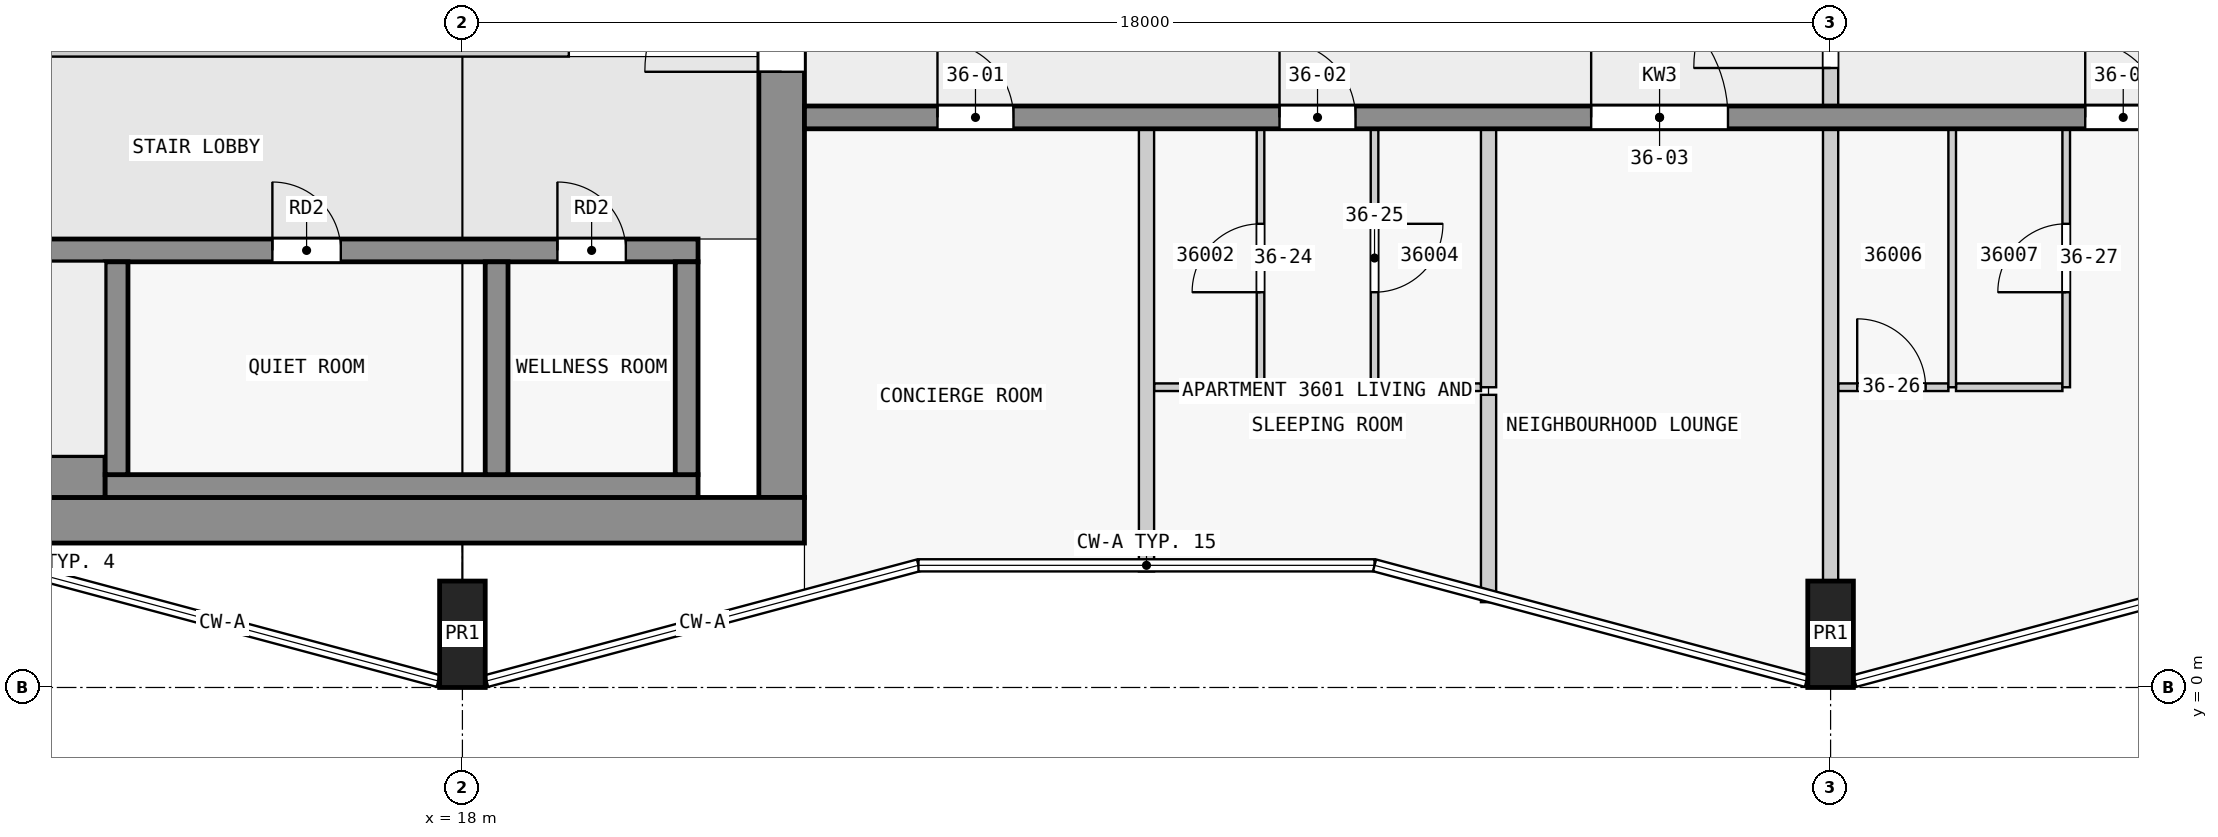
"""IFC4 building model, lengths in metres.
Left out: names, types, materials, properties, quantities, classifications, styles, units other than length and angle.
Written with IfcOpenShell. Run it as: python <this file> out.ifc"""

import sys

from ifc_helpers import new_model, si_unit, direction, frame, frame_2d, origin, origin_2d, place, context, subcontext, project, spatial, rectangle, extrude, element, fill, save


model = new_model("IFC4")
c1 = context("Model", 3, precision=1e-05, world=origin(), true_north=direction((0.0, 1.0)))
c2 = subcontext(c1, "Body", "Model", "MODEL_VIEW")
j1 = project(units=[si_unit("LENGTHUNIT", "METRE"), si_unit("PLANEANGLEUNIT", "RADIAN")], contexts=[c1])
p1 = place(None, origin())
s1 = spatial("IfcSite", under=j1, at=p1, CompositionType="ELEMENT")
p2 = place(p1, origin())
s2 = spatial("IfcBuilding", under=s1, at=p2, CompositionType="ELEMENT")
p3 = place(p2, frame((0.0, 0.0, 142.9)))
s3 = spatial("IfcBuildingStorey", under=s2, at=p3, CompositionType="ELEMENT", Elevation=142.9)
for number, where, z_axis, x_axis in (
    (1, (18.0, 0.7, 0.0), (0.0, 0.0, 1.0), (1.0, 0.0, 0.0)),
    (2, (36.0, 0.7, 0.0), (0.0, 0.0, 1.0), (1.0, 0.0, 0.0)),
):
    element("IfcColumn", number, at=place(p3, frame(where, z_axis=z_axis, x_axis=x_axis)), inside=s3, PredefinedType="COLUMN", context=c2, shape_type="SweptSolid", body=[
        extrude(rectangle(XDim=0.6, YDim=1.4, at=origin_2d()), origin(), (0.0, 0.0, 1.0), 3.5),
    ])
p4 = place(p3, frame((1.7, 2.2, 0.0), z_axis=(0.0, 0.0, 1.0), x_axis=(1.0, 0.0, 0.0)))
e3 = element("IfcWall", 3, at=p4, inside=s3, PredefinedType="SHEAR", context=c2, shape_type="SweptSolid", body=[
    extrude(rectangle(XDim=20.8, YDim=0.6, at=frame_2d((10.4, 0.0))), origin(), (0.0, 0.0, 1.0), 3.25),
])
p5 = place(p3, frame((22.2, 2.5, 0.0), z_axis=(0.0, 0.0, 1.0), x_axis=(0.0, 1.0, 0.0)))
e4 = element("IfcWall", 4, at=p5, inside=s3, PredefinedType="SHEAR", context=c2, shape_type="SweptSolid", body=[
    extrude(rectangle(XDim=14.9, YDim=0.6, at=frame_2d((7.45, 0.0))), origin(), (0.0, 0.0, 1.0), 3.25),
])
p6 = place(p5, frame((5.6, 0.0, 0.0)))
e5 = element("IfcOpeningElement", 5, at=p6, cuts=e4, PredefinedType="OPENING", context=c2, shape_type="SweptSolid", body=[
    extrude(rectangle(XDim=1.8, YDim=2.1, at=frame_2d((0.9, 1.05))), frame((0.0, 0.31, 0.0), z_axis=(0.0, -1.0, 0.0), x_axis=(1.0, 0.0, 0.0)), (0.0, 0.0, 1.0), 0.62),
])
p7 = place(p3, frame((6.9, 2.775, 0.0), z_axis=(0.0, 0.0, 1.0), x_axis=(1.0, 0.0, 0.0)))
e6 = element("IfcWall", 6, at=p7, inside=s3, PredefinedType="SHEAR", context=c2, shape_type="SweptSolid", body=[
    extrude(rectangle(XDim=6.4, YDim=0.55, at=frame_2d((3.2, 0.0))), origin(), (0.0, 0.0, 1.0), 3.25),
])
p8 = place(p3, frame((13.3, 2.65, 0.0), z_axis=(0.0, 0.0, 1.0), x_axis=(1.0, 0.0, 0.0)))
e7 = element("IfcWall", 7, at=p8, inside=s3, PredefinedType="SHEAR", context=c2, shape_type="SweptSolid", body=[
    extrude(rectangle(XDim=7.8, YDim=0.3, at=frame_2d((3.9, 0.0))), origin(), (0.0, 0.0, 1.0), 3.25),
])
for number, where, z_axis, x_axis in (
    (8, (13.45, 2.8, 0.0), (0.0, 0.0, 1.0), (0.0, 1.0, 0.0)),
    (9, (18.45, 2.8, 0.0), (0.0, 0.0, 1.0), (0.0, 1.0, 0.0)),
    (10, (20.95, 2.8, 0.0), (0.0, 0.0, 1.0), (0.0, 1.0, 0.0)),
):
    element("IfcWall", number, at=place(p3, frame(where, z_axis=z_axis, x_axis=x_axis)), inside=s3, PredefinedType="SHEAR", context=c2, shape_type="SweptSolid", body=[
        extrude(rectangle(XDim=2.8, YDim=0.3, at=frame_2d((1.4, 0.0))), origin(), (0.0, 0.0, 1.0), 3.25),
    ])
p9 = place(p3, frame((2.3, 5.75, 0.0), z_axis=(0.0, 0.0, 1.0), x_axis=(1.0, 0.0, 0.0)))
e11 = element("IfcWall", 11, at=p9, inside=s3, PredefinedType="SHEAR", context=c2, shape_type="SweptSolid", body=[
    extrude(rectangle(XDim=18.8, YDim=0.3, at=frame_2d((9.4, 0.0))), origin(), (0.0, 0.0, 1.0), 3.25),
])
p10 = place(p9, frame((4.65, 0.0, 0.0)))
e12 = element("IfcOpeningElement", 12, at=p10, cuts=e11, PredefinedType="OPENING", context=c2, shape_type="SweptSolid", body=[
    extrude(rectangle(XDim=1.1, YDim=2.1, at=frame_2d((0.55, 1.05))), frame((0.0, 0.16, 0.0), z_axis=(0.0, -1.0, 0.0), x_axis=(1.0, 0.0, 0.0)), (0.0, 0.0, 1.0), 0.32),
])
p11 = place(p9, frame((0.45, 0.0, 0.0)))
e13 = element("IfcOpeningElement", 13, at=p11, cuts=e11, PredefinedType="OPENING", context=c2, shape_type="SweptSolid", body=[
    extrude(rectangle(XDim=1.1, YDim=2.1, at=frame_2d((0.55, 1.05))), frame((0.0, 0.16, 0.0), z_axis=(0.0, -1.0, 0.0), x_axis=(1.0, 0.0, 0.0)), (0.0, 0.0, 1.0), 0.32),
])
p12 = place(p9, frame((2.75, 0.0, 0.0)))
e14 = element("IfcOpeningElement", 14, at=p12, cuts=e11, PredefinedType="OPENING", context=c2, shape_type="SweptSolid", body=[
    extrude(rectangle(XDim=1.1, YDim=2.1, at=frame_2d((0.55, 1.05))), frame((0.0, 0.16, 0.0), z_axis=(0.0, -1.0, 0.0), x_axis=(1.0, 0.0, 0.0)), (0.0, 0.0, 1.0), 0.32),
])
p13 = place(p9, frame((13.2, 0.0, 0.0)))
e15 = element("IfcOpeningElement", 15, at=p13, cuts=e11, PredefinedType="OPENING", context=c2, shape_type="SweptSolid", body=[
    extrude(rectangle(XDim=0.9, YDim=2.1, at=frame_2d((0.45, 1.05))), frame((0.0, 0.16, 0.0), z_axis=(0.0, -1.0, 0.0), x_axis=(1.0, 0.0, 0.0)), (0.0, 0.0, 1.0), 0.32),
])
p14 = place(p9, frame((16.95, 0.0, 0.0)))
e16 = element("IfcOpeningElement", 16, at=p14, cuts=e11, PredefinedType="OPENING", context=c2, shape_type="SweptSolid", body=[
    extrude(rectangle(XDim=0.9, YDim=2.1, at=frame_2d((0.45, 1.05))), frame((0.0, 0.16, 0.0), z_axis=(0.0, -1.0, 0.0), x_axis=(1.0, 0.0, 0.0)), (0.0, 0.0, 1.0), 0.32),
])
p15 = place(p3, frame((22.5, 7.5, 0.0), z_axis=(0.0, 0.0, 1.0), x_axis=(1.0, 0.0, 0.0)))
e17 = element("IfcWall", 17, at=p15, inside=s3, PredefinedType="SHEAR", context=c2, shape_type="SweptSolid", body=[
    extrude(rectangle(XDim=22.5, YDim=0.3, at=frame_2d((11.25, 0.0))), origin(), (0.0, 0.0, 1.0), 3.25),
])
p16 = place(p15, frame((1.75, 0.0, 0.0)))
e18 = element("IfcOpeningElement", 18, at=p16, cuts=e17, PredefinedType="OPENING", context=c2, shape_type="SweptSolid", body=[
    extrude(rectangle(XDim=1.0, YDim=2.1, at=frame_2d((0.5, 1.05))), frame((0.0, 0.16, 0.0), z_axis=(0.0, -1.0, 0.0), x_axis=(1.0, 0.0, 0.0)), (0.0, 0.0, 1.0), 0.32),
])
p17 = place(p15, frame((6.25, 0.0, 0.0)))
e19 = element("IfcOpeningElement", 19, at=p17, cuts=e17, PredefinedType="OPENING", context=c2, shape_type="SweptSolid", body=[
    extrude(rectangle(XDim=1.0, YDim=2.1, at=frame_2d((0.5, 1.05))), frame((0.0, 0.16, 0.0), z_axis=(0.0, -1.0, 0.0), x_axis=(1.0, 0.0, 0.0)), (0.0, 0.0, 1.0), 0.32),
])
p18 = place(p15, frame((10.35, 0.0, 0.0)))
e20 = element("IfcOpeningElement", 20, at=p18, cuts=e17, PredefinedType="OPENING", context=c2, shape_type="SweptSolid", body=[
    extrude(rectangle(XDim=1.8, YDim=2.1, at=frame_2d((0.9, 1.05))), frame((0.0, 0.16, 0.0), z_axis=(0.0, -1.0, 0.0), x_axis=(1.0, 0.0, 0.0)), (0.0, 0.0, 1.0), 0.32),
])
p19 = place(p15, frame((16.85, 0.0, 0.0)))
e21 = element("IfcOpeningElement", 21, at=p19, cuts=e17, PredefinedType="OPENING", context=c2, shape_type="SweptSolid", body=[
    extrude(rectangle(XDim=1.0, YDim=2.1, at=frame_2d((0.5, 1.05))), frame((0.0, 0.16, 0.0), z_axis=(0.0, -1.0, 0.0), x_axis=(1.0, 0.0, 0.0)), (0.0, 0.0, 1.0), 0.32),
])
p20 = place(p3, frame((10.9, 8.4, 0.0), z_axis=(0.0, 0.0, 1.0), x_axis=(1.0, 0.0, 0.0)))
e22 = element("IfcWall", 22, at=p20, inside=s3, PredefinedType="PARTITIONING", context=c2, shape_type="SweptSolid", body=[
    extrude(rectangle(XDim=8.5, YDim=0.2, at=frame_2d((4.25, 0.0))), origin(), (0.0, 0.0, 1.0), 3.25),
])
for number, where, z_axis, x_axis in (
    (23, (27.1, 3.95, 0.0), (0.0, 0.0, 1.0), (1.0, 0.0, 0.0)),
    (24, (30.05, 3.95, 0.0), (0.0, 0.0, 1.0), (1.0, 0.0, 0.0)),
):
    element("IfcWall", number, at=place(p3, frame(where, z_axis=z_axis, x_axis=x_axis)), inside=s3, PredefinedType="PARTITIONING", context=c2, shape_type="SweptSolid", body=[
        extrude(rectangle(XDim=1.35, YDim=0.1, at=frame_2d((0.675, 0.0))), origin(), (0.0, 0.0, 1.0), 3.25),
    ])
p21 = place(p3, frame((36.1, 3.95, 0.0), z_axis=(0.0, 0.0, 1.0), x_axis=(1.0, 0.0, 0.0)))
e25 = element("IfcWall", 25, at=p21, inside=s3, PredefinedType="PARTITIONING", context=c2, shape_type="SweptSolid", body=[
    extrude(rectangle(XDim=1.45, YDim=0.1, at=frame_2d((0.725, 0.0))), origin(), (0.0, 0.0, 1.0), 3.25),
])
p22 = place(p21, frame((0.25, 0.0, 0.0)))
e26 = element("IfcOpeningElement", 26, at=p22, cuts=e25, PredefinedType="OPENING", context=c2, shape_type="SweptSolid", body=[
    extrude(rectangle(XDim=0.9, YDim=2.1, at=frame_2d((0.45, 1.05))), frame((0.0, 0.06, 0.0), z_axis=(0.0, -1.0, 0.0), x_axis=(1.0, 0.0, 0.0)), (0.0, 0.0, 1.0), 0.12),
])
p23 = place(p3, frame((37.65, 3.95, 0.0), z_axis=(0.0, 0.0, 1.0), x_axis=(1.0, 0.0, 0.0)))
e27 = element("IfcWall", 27, at=p23, inside=s3, PredefinedType="PARTITIONING", context=c2, shape_type="SweptSolid", body=[
    extrude(rectangle(XDim=1.4, YDim=0.1, at=frame_2d((0.7, 0.0))), origin(), (0.0, 0.0, 1.0), 3.25),
])
p24 = place(p3, frame((27.0, 1.527, 0.0), z_axis=(0.0, 0.0, 1.0), x_axis=(0.0, 1.0, 0.0)))
e28 = element("IfcWall", 28, at=p24, inside=s3, PredefinedType="PARTITIONING", context=c2, shape_type="SweptSolid", body=[
    extrude(rectangle(XDim=5.823, YDim=0.2, at=frame_2d((2.912, 0.0))), origin(), (0.0, 0.0, 1.0), 3.25),
])
p25 = place(p3, frame((28.5, 3.95, 0.0), z_axis=(0.0, 0.0, 1.0), x_axis=(0.0, 1.0, 0.0)))
e29 = element("IfcWall", 29, at=p25, inside=s3, PredefinedType="PARTITIONING", context=c2, shape_type="SweptSolid", body=[
    extrude(rectangle(XDim=3.4, YDim=0.1, at=frame_2d((1.7, 0.0))), origin(), (0.0, 0.0, 1.0), 3.25),
])
p26 = place(p25, frame((1.25, 0.0, 0.0)))
e30 = element("IfcOpeningElement", 30, at=p26, cuts=e29, PredefinedType="OPENING", context=c2, shape_type="SweptSolid", body=[
    extrude(rectangle(XDim=0.9, YDim=2.1, at=frame_2d((0.45, 1.05))), frame((0.0, 0.06, 0.0), z_axis=(0.0, -1.0, 0.0), x_axis=(1.0, 0.0, 0.0)), (0.0, 0.0, 1.0), 0.12),
])
p27 = place(p3, frame((30.0, 7.35, 0.0), z_axis=(0.0, 0.0, 1.0), x_axis=(0.0, -1.0, 0.0)))
e31 = element("IfcWall", 31, at=p27, inside=s3, PredefinedType="PARTITIONING", context=c2, shape_type="SweptSolid", body=[
    extrude(rectangle(XDim=3.4, YDim=0.1, at=frame_2d((1.7, 0.0))), origin(), (0.0, 0.0, 1.0), 3.25),
])
p28 = place(p27, frame((1.25, 0.0, 0.0)))
e32 = element("IfcOpeningElement", 32, at=p28, cuts=e31, PredefinedType="OPENING", context=c2, shape_type="SweptSolid", body=[
    extrude(rectangle(XDim=0.9, YDim=2.1, at=frame_2d((0.45, 1.05))), frame((0.0, 0.06, 0.0), z_axis=(0.0, -1.0, 0.0), x_axis=(1.0, 0.0, 0.0)), (0.0, 0.0, 1.0), 0.12),
])
p29 = place(p3, frame((31.5, 3.85, 0.0), z_axis=(0.0, 0.0, 1.0), x_axis=(0.0, -1.0, 0.0)))
e33 = element("IfcWall", 33, at=p29, inside=s3, PredefinedType="PARTITIONING", context=c2, shape_type="SweptSolid", body=[
    extrude(rectangle(XDim=2.728, YDim=0.2, at=frame_2d((1.364, 0.0))), origin(), (0.0, 0.0, 1.0), 3.25),
])
p30 = place(p3, frame((31.5, 3.95, 0.0), z_axis=(0.0, 0.0, 1.0), x_axis=(0.0, 1.0, 0.0)))
e34 = element("IfcWall", 34, at=p30, inside=s3, PredefinedType="PARTITIONING", context=c2, shape_type="SweptSolid", body=[
    extrude(rectangle(XDim=3.4, YDim=0.2, at=frame_2d((1.7, 0.0))), origin(), (0.0, 0.0, 1.0), 3.25),
])
p31 = place(p3, frame((36.0, 1.4, 0.0), z_axis=(0.0, 0.0, 1.0), x_axis=(0.0, 1.0, 0.0)))
e35 = element("IfcWall", 35, at=p31, inside=s3, PredefinedType="PARTITIONING", context=c2, shape_type="SweptSolid", body=[
    extrude(rectangle(XDim=5.95, YDim=0.2, at=frame_2d((2.975, 0.0))), origin(), (0.0, 0.0, 1.0), 3.25),
])
p32 = place(p3, frame((37.6, 3.95, 0.0), z_axis=(0.0, 0.0, 1.0), x_axis=(0.0, 1.0, 0.0)))
e36 = element("IfcWall", 36, at=p32, inside=s3, PredefinedType="PARTITIONING", context=c2, shape_type="SweptSolid", body=[
    extrude(rectangle(XDim=3.4, YDim=0.1, at=frame_2d((1.7, 0.0))), origin(), (0.0, 0.0, 1.0), 3.25),
])
p33 = place(p3, frame((39.1, 3.95, 0.0), z_axis=(0.0, 0.0, 1.0), x_axis=(0.0, 1.0, 0.0)))
e37 = element("IfcWall", 37, at=p33, inside=s3, PredefinedType="PARTITIONING", context=c2, shape_type="SweptSolid", body=[
    extrude(rectangle(XDim=3.4, YDim=0.1, at=frame_2d((1.7, 0.0))), origin(), (0.0, 0.0, 1.0), 3.25),
])
p34 = place(p33, frame((1.25, 0.0, 0.0)))
e38 = element("IfcOpeningElement", 38, at=p34, cuts=e37, PredefinedType="OPENING", context=c2, shape_type="SweptSolid", body=[
    extrude(rectangle(XDim=0.9, YDim=2.1, at=frame_2d((0.45, 1.05))), frame((0.0, 0.06, 0.0), z_axis=(0.0, -1.0, 0.0), x_axis=(1.0, 0.0, 0.0)), (0.0, 0.0, 1.0), 0.12),
])
p35 = place(p3, frame((36.0, 7.45, 0.0), z_axis=(0.0, 0.0, 1.0), x_axis=(0.0, 1.0, 0.0)))
e39 = element("IfcWall", 39, at=p35, inside=s3, PredefinedType="PARTITIONING", context=c2, shape_type="SweptSolid", body=[
    extrude(rectangle(XDim=3.1, YDim=0.2, at=frame_2d((1.55, 0.0))), origin(), (0.0, 0.0, 1.0), 3.25),
])
p36 = place(p35, frame((0.7, 0.0, 0.0)))
e40 = element("IfcOpeningElement", 40, at=p36, cuts=e39, PredefinedType="OPENING", context=c2, shape_type="SweptSolid", body=[
    extrude(rectangle(XDim=1.8, YDim=2.1, at=frame_2d((0.9, 1.05))), frame((0.0, 0.11, 0.0), z_axis=(0.0, -1.0, 0.0), x_axis=(1.0, 0.0, 0.0)), (0.0, 0.0, 1.0), 0.22),
])
p37 = place(p6, origin())
e41 = element("IfcDoor", 41, at=p37, inside=s3, OperationType="DOUBLE_DOOR_SINGLE_SWING", PredefinedType="DOOR", context=c2, shape_type="SweptSolid", body=[
    extrude(rectangle(XDim=1.8, YDim=2.1, at=frame_2d((0.9, 1.05))), frame((0.0, 0.025, 0.0), z_axis=(0.0, -1.0, 0.0), x_axis=(1.0, 0.0, 0.0)), (0.0, 0.0, 1.0), 0.05),
])
fill(e5, e41)
p38 = place(p13, origin())
e42 = element("IfcDoor", 42, at=p38, inside=s3, OperationType="SINGLE_SWING_LEFT", PredefinedType="DOOR", context=c2, shape_type="SweptSolid", body=[
    extrude(rectangle(XDim=0.9, YDim=2.1, at=frame_2d((0.45, 1.05))), frame((0.0, 0.025, 0.0), z_axis=(0.0, -1.0, 0.0), x_axis=(1.0, 0.0, 0.0)), (0.0, 0.0, 1.0), 0.05),
])
fill(e15, e42)
p39 = place(p14, origin())
e43 = element("IfcDoor", 43, at=p39, inside=s3, OperationType="SINGLE_SWING_LEFT", PredefinedType="DOOR", context=c2, shape_type="SweptSolid", body=[
    extrude(rectangle(XDim=0.9, YDim=2.1, at=frame_2d((0.45, 1.05))), frame((0.0, 0.025, 0.0), z_axis=(0.0, -1.0, 0.0), x_axis=(1.0, 0.0, 0.0)), (0.0, 0.0, 1.0), 0.05),
])
fill(e16, e43)
p40 = place(p16, origin())
e44 = element("IfcDoor", 44, at=p40, inside=s3, OperationType="SINGLE_SWING_LEFT", PredefinedType="DOOR", context=c2, shape_type="SweptSolid", body=[
    extrude(rectangle(XDim=1.0, YDim=2.1, at=frame_2d((0.5, 1.05))), frame((0.0, 0.025, 0.0), z_axis=(0.0, -1.0, 0.0), x_axis=(1.0, 0.0, 0.0)), (0.0, 0.0, 1.0), 0.05),
])
fill(e18, e44)
p41 = place(p17, origin())
e45 = element("IfcDoor", 45, at=p41, inside=s3, OperationType="SINGLE_SWING_LEFT", PredefinedType="DOOR", context=c2, shape_type="SweptSolid", body=[
    extrude(rectangle(XDim=1.0, YDim=2.1, at=frame_2d((0.5, 1.05))), frame((0.0, 0.025, 0.0), z_axis=(0.0, -1.0, 0.0), x_axis=(1.0, 0.0, 0.0)), (0.0, 0.0, 1.0), 0.05),
])
fill(e19, e45)
p42 = place(p18, origin())
e46 = element("IfcDoor", 46, at=p42, inside=s3, OperationType="SINGLE_SWING_LEFT", PredefinedType="DOOR", context=c2, shape_type="SweptSolid", body=[
    extrude(rectangle(XDim=1.8, YDim=2.1, at=frame_2d((0.9, 1.05))), frame((0.0, 0.025, 0.0), z_axis=(0.0, -1.0, 0.0), x_axis=(1.0, 0.0, 0.0)), (0.0, 0.0, 1.0), 0.05),
])
fill(e20, e46)
p43 = place(p19, origin())
e47 = element("IfcDoor", 47, at=p43, inside=s3, OperationType="SINGLE_SWING_RIGHT", PredefinedType="DOOR", context=c2, shape_type="SweptSolid", body=[
    extrude(rectangle(XDim=1.0, YDim=2.1, at=frame_2d((0.5, 1.05))), frame((0.0, 0.025, 0.0), z_axis=(0.0, -1.0, 0.0), x_axis=(1.0, 0.0, 0.0)), (0.0, 0.0, 1.0), 0.05),
])
fill(e21, e47)
p44 = place(p36, origin())
e48 = element("IfcDoor", 48, at=p44, inside=s3, OperationType="SINGLE_SWING_RIGHT", PredefinedType="DOOR", context=c2, shape_type="SweptSolid", body=[
    extrude(rectangle(XDim=1.8, YDim=2.1, at=frame_2d((0.9, 1.05))), frame((0.0, 0.025, 0.0), z_axis=(0.0, -1.0, 0.0), x_axis=(1.0, 0.0, 0.0)), (0.0, 0.0, 1.0), 0.05),
])
fill(e40, e48)
p45 = place(p26, origin())
e49 = element("IfcDoor", 49, at=p45, inside=s3, OperationType="SINGLE_SWING_RIGHT", PredefinedType="DOOR", context=c2, shape_type="SweptSolid", body=[
    extrude(rectangle(XDim=0.9, YDim=2.1, at=frame_2d((0.45, 1.05))), frame((0.0, 0.025, 0.0), z_axis=(0.0, -1.0, 0.0), x_axis=(1.0, 0.0, 0.0)), (0.0, 0.0, 1.0), 0.05),
])
fill(e30, e49)
p46 = place(p28, origin())
e50 = element("IfcDoor", 50, at=p46, inside=s3, OperationType="SINGLE_SWING_RIGHT", PredefinedType="DOOR", context=c2, shape_type="SweptSolid", body=[
    extrude(rectangle(XDim=0.9, YDim=2.1, at=frame_2d((0.45, 1.05))), frame((0.0, 0.025, 0.0), z_axis=(0.0, -1.0, 0.0), x_axis=(1.0, 0.0, 0.0)), (0.0, 0.0, 1.0), 0.05),
])
fill(e32, e50)
p47 = place(p22, origin())
e51 = element("IfcDoor", 51, at=p47, inside=s3, OperationType="SINGLE_SWING_LEFT", PredefinedType="DOOR", context=c2, shape_type="SweptSolid", body=[
    extrude(rectangle(XDim=0.9, YDim=2.1, at=frame_2d((0.45, 1.05))), frame((0.0, 0.025, 0.0), z_axis=(0.0, -1.0, 0.0), x_axis=(1.0, 0.0, 0.0)), (0.0, 0.0, 1.0), 0.05),
])
fill(e26, e51)
p48 = place(p34, origin())
e52 = element("IfcDoor", 52, at=p48, inside=s3, OperationType="SINGLE_SWING_RIGHT", PredefinedType="DOOR", context=c2, shape_type="SweptSolid", body=[
    extrude(rectangle(XDim=0.9, YDim=2.1, at=frame_2d((0.45, 1.05))), frame((0.0, 0.025, 0.0), z_axis=(0.0, -1.0, 0.0), x_axis=(1.0, 0.0, 0.0)), (0.0, 0.0, 1.0), 0.05),
])
fill(e38, e52)
save(model, sys.argv[1])
